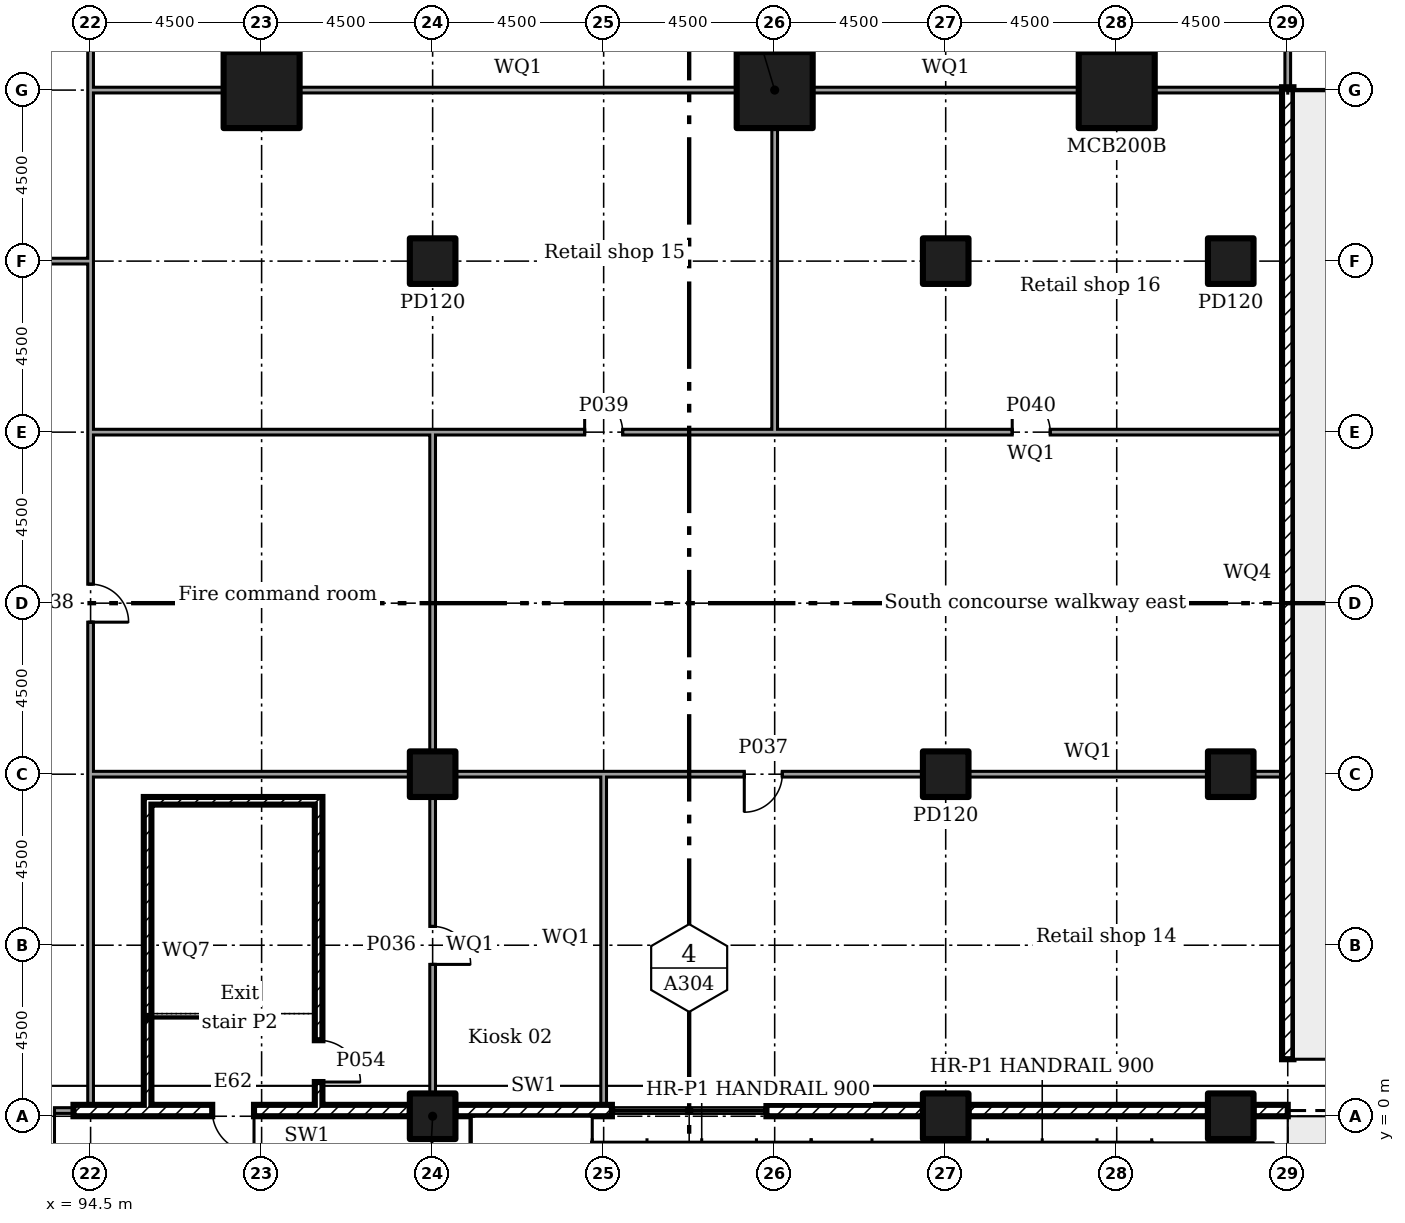
"""IFC4 building model, lengths in metres.
Left out: names, types, materials, properties, quantities, classifications, styles, units other than length and angle.
Written with IfcOpenShell. Run it as: python <this file> out.ifc"""

import sys

from ifc_helpers import new_model, si_unit, direction, frame, frame_2d, origin, origin_2d, place, context, subcontext, project, spatial, rectangle, extrude, element, fill, save


model = new_model("IFC4")
c1 = context("Model", 3, precision=1e-05, world=origin(), true_north=direction((0.0, 1.0)))
c2 = subcontext(c1, "Body", "Model", "MODEL_VIEW")
j1 = project(units=[si_unit("LENGTHUNIT", "METRE"), si_unit("PLANEANGLEUNIT", "RADIAN")], contexts=[c1])
p1 = place(None, origin())
s1 = spatial("IfcSite", under=j1, at=p1, CompositionType="ELEMENT")
p2 = place(p1, origin())
s2 = spatial("IfcBuilding", under=s1, at=p2, CompositionType="ELEMENT")
p3 = place(p2, origin())
s3 = spatial("IfcBuildingStorey", under=s2, at=p3, CompositionType="ELEMENT", Elevation=0.0)
for number, where in (
    (1, (99.0, 27.0, 0.0)),
    (2, (112.5, 27.0, 0.0)),
    (3, (121.5, 27.0, 0.0)),
):
    element("IfcColumn", number, at=place(p3, frame(where)), inside=s3, PredefinedType="COLUMN", context=c2, shape_type="SweptSolid", body=[
        extrude(rectangle(XDim=2.0, YDim=2.0, at=origin_2d()), origin(), (0.0, 0.0, 1.0), 6.0),
    ])
for number, where in (
    (4, (103.5, 0.0, 0.0)),
    (5, (103.5, 9.0, 0.0)),
    (6, (103.5, 22.5, 0.0)),
    (7, (117.0, 0.0, 0.0)),
    (8, (117.0, 9.0, 0.0)),
    (9, (117.0, 22.5, 0.0)),
    (10, (124.5, 0.0, 0.0)),
    (11, (124.5, 9.0, 0.0)),
    (12, (124.5, 22.5, 0.0)),
):
    element("IfcColumn", number, at=place(p3, frame(where)), inside=s3, PredefinedType="COLUMN", context=c2, shape_type="SweptSolid", body=[
        extrude(rectangle(XDim=1.2, YDim=1.2, at=origin_2d()), origin(), (0.0, 0.0, 1.0), 6.0),
    ])
p4 = place(p3, frame((90.6, 0.15, 0.0)))
e13 = element("IfcWall", 13, at=p4, inside=s3, PredefinedType="SOLIDWALL", context=c2, shape_type="SweptSolid", body=[
    extrude(rectangle(XDim=3.45, YDim=0.15, at=frame_2d((1.725, 0.0))), origin(), (0.0, 0.0, 1.0), 5.55),
])
p5 = place(p4, frame((0.55, 0.0, 0.0)))
e14 = element("IfcOpeningElement", 14, at=p5, cuts=e13, PredefinedType="OPENING", context=c2, shape_type="SweptSolid", body=[
    extrude(rectangle(XDim=2.4, YDim=2.7, at=frame_2d((1.2, 1.35))), frame((0.0, 0.085, 0.0), z_axis=(0.0, -1.0, 0.0), x_axis=(1.0, 0.0, 0.0)), (0.0, 0.0, 1.0), 0.17),
])
p6 = place(p3, frame((94.05, 0.15, 0.0)))
e15 = element("IfcWall", 15, at=p6, inside=s3, PredefinedType="ELEMENTEDWALL", context=c2, shape_type="SweptSolid", body=[
    extrude(rectangle(XDim=3.15, YDim=0.3, at=frame_2d((1.575, 0.0))), origin(), (0.0, 0.0, 1.0), 5.55),
])
p7 = place(p3, frame((97.2, 0.15, 0.0)))
e16 = element("IfcWall", 16, at=p7, inside=s3, PredefinedType="ELEMENTEDWALL", context=c2, shape_type="SweptSolid", body=[
    extrude(rectangle(XDim=2.1, YDim=0.3, at=frame_2d((1.05, 0.0))), origin(), (0.0, 0.0, 1.0), 5.55),
])
p8 = place(p7, frame((0.5, 0.0, 0.0)))
e17 = element("IfcOpeningElement", 17, at=p8, cuts=e16, PredefinedType="OPENING", context=c2, shape_type="SweptSolid", body=[
    extrude(rectangle(XDim=1.1, YDim=2.4, at=frame_2d((0.55, 1.2))), frame((0.0, 0.16, 0.0), z_axis=(0.0, -1.0, 0.0), x_axis=(1.0, 0.0, 0.0)), (0.0, 0.0, 1.0), 0.32),
])
p9 = place(p3, frame((99.3, 0.15, 0.0)))
e18 = element("IfcWall", 18, at=p9, inside=s3, PredefinedType="ELEMENTEDWALL", context=c2, shape_type="SweptSolid", body=[
    extrude(rectangle(XDim=3.6, YDim=0.3, at=frame_2d((1.8, 0.0))), origin(), (0.0, 0.0, 1.0), 5.55),
])
for number, where in (
    (19, (104.1, 0.15, 0.0)),
    (20, (112.283, 0.15, 0.0)),
):
    element("IfcWall", number, at=place(p3, frame(where)), inside=s3, PredefinedType="ELEMENTEDWALL", context=c2, shape_type="SweptSolid", body=[
        extrude(rectangle(XDim=4.116, YDim=0.3, at=frame_2d((2.058, 0.0))), origin(), (0.0, 0.0, 1.0), 5.55),
    ])
p10 = place(p3, frame((117.6, 0.15, 0.0)))
e21 = element("IfcWall", 21, at=p10, inside=s3, PredefinedType="ELEMENTEDWALL", context=c2, shape_type="SweptSolid", body=[
    extrude(rectangle(XDim=6.3, YDim=0.3, at=frame_2d((3.15, 0.0))), origin(), (0.0, 0.0, 1.0), 5.55),
])
p11 = place(p3, frame((125.1, 0.15, 0.0)))
e22 = element("IfcWall", 22, at=p11, inside=s3, PredefinedType="ELEMENTEDWALL", context=c2, shape_type="SweptSolid", body=[
    extrude(rectangle(XDim=0.4, YDim=0.3, at=frame_2d((0.2, 0.0))), origin(), (0.0, 0.0, 1.0), 5.55),
])
p12 = place(p3, frame((125.5, 0.15, 0.0)))
e23 = element("IfcWall", 23, at=p12, inside=s3, PredefinedType="ELEMENTEDWALL", context=c2, shape_type="SweptSolid", body=[
    extrude(rectangle(XDim=10.0, YDim=0.3, at=frame_2d((5.0, 0.0))), origin(), (0.0, 0.0, 1.0), 4.05),
])
p13 = place(p12, frame((0.5, 0.0, 0.0)))
e24 = element("IfcOpeningElement", 24, at=p13, cuts=e23, PredefinedType="OPENING", context=c2, shape_type="SweptSolid", body=[
    extrude(rectangle(XDim=9.0, YDim=3.5, at=frame_2d((4.5, 1.75))), frame((0.0, 0.16, 0.0), z_axis=(0.0, -1.0, 0.0), x_axis=(1.0, 0.0, 0.0)), (0.0, 0.0, 1.0), 0.32),
])
p14 = place(p3, frame((90.595, 22.5, 0.0)))
e25 = element("IfcWall", 25, at=p14, inside=s3, PredefinedType="PARTITIONING", context=c2, shape_type="SweptSolid", body=[
    extrude(rectangle(XDim=3.98, YDim=0.15, at=frame_2d((1.99, 0.0))), origin(), (0.0, 0.0, 1.0), 5.55),
])
p15 = place(p3, frame((94.5, 0.3, 0.0), z_axis=(0.0, 0.0, 1.0), x_axis=(0.0, 1.0, 0.0)))
e26 = element("IfcWall", 26, at=p15, inside=s3, PredefinedType="PARTITIONING", context=c2, shape_type="SweptSolid", body=[
    extrude(rectangle(XDim=8.775, YDim=0.15, at=frame_2d((4.387, 0.0))), origin(), (0.0, 0.0, 1.0), 5.55),
])
p16 = place(p3, frame((94.5, 9.0, 0.0), z_axis=(0.0, 0.0, 1.0), x_axis=(0.0, 1.0, 0.0)))
e27 = element("IfcWall", 27, at=p16, inside=s3, PredefinedType="PARTITIONING", context=c2, shape_type="SweptSolid", body=[
    extrude(rectangle(XDim=9.075, YDim=0.15, at=frame_2d((4.538, 0.0))), origin(), (0.0, 0.0, 1.0), 5.55),
])
p17 = place(p16, frame((4.0, 0.0, 0.0)))
e28 = element("IfcOpeningElement", 28, at=p17, cuts=e27, PredefinedType="OPENING", context=c2, shape_type="SweptSolid", body=[
    extrude(rectangle(XDim=1.0, YDim=2.1, at=frame_2d((0.5, 1.05))), frame((0.0, 0.085, 0.0), z_axis=(0.0, -1.0, 0.0), x_axis=(1.0, 0.0, 0.0)), (0.0, 0.0, 1.0), 0.17),
])
p18 = place(p3, frame((94.5, 18.0, 0.0), z_axis=(0.0, 0.0, 1.0), x_axis=(0.0, 1.0, 0.0)))
e29 = element("IfcWall", 29, at=p18, inside=s3, PredefinedType="PARTITIONING", context=c2, shape_type="SweptSolid", body=[
    extrude(rectangle(XDim=4.425, YDim=0.15, at=frame_2d((2.212, 0.0))), origin(), (0.0, 0.0, 1.0), 5.55),
])
p19 = place(p3, frame((94.5, 26.925, 0.0), z_axis=(0.0, 0.0, 1.0), x_axis=(0.0, 1.0, 0.0)))
e30 = element("IfcWall", 30, at=p19, inside=s3, PredefinedType="PARTITIONING", context=c2, shape_type="SweptSolid", body=[
    extrude(rectangle(XDim=3.58, YDim=0.15, at=frame_2d((1.79, 0.0))), origin(), (0.0, 0.0, 1.0), 5.55),
])
p20 = place(p3, frame((94.5, 22.5, 0.0), z_axis=(0.0, 0.0, 1.0), x_axis=(0.0, 1.0, 0.0)))
e31 = element("IfcWall", 31, at=p20, inside=s3, PredefinedType="PARTITIONING", context=c2, shape_type="SweptSolid", body=[
    extrude(rectangle(XDim=4.5, YDim=0.15, at=frame_2d((2.25, 0.0))), origin(), (0.0, 0.0, 1.0), 5.55),
])
p21 = place(p3, frame((99.0, 27.995, 0.0), z_axis=(0.0, 0.0, 1.0), x_axis=(0.0, 1.0, 0.0)))
e32 = element("IfcWall", 32, at=p21, inside=s3, PredefinedType="PARTITIONING", context=c2, shape_type="SweptSolid", body=[
    extrude(rectangle(XDim=3.505, YDim=0.15, at=frame_2d((1.752, 0.0))), origin(), (0.0, 0.0, 1.0), 5.55),
])
p22 = place(p3, frame((94.575, 27.0, 0.0)))
e33 = element("IfcWall", 33, at=p22, inside=s3, PredefinedType="PARTITIONING", context=c2, shape_type="SweptSolid", body=[
    extrude(rectangle(XDim=3.43, YDim=0.15, at=frame_2d((1.715, 0.0))), origin(), (0.0, 0.0, 1.0), 5.55),
])
p23 = place(p3, frame((112.5, 27.995, 0.0), z_axis=(0.0, 0.0, 1.0), x_axis=(0.0, 1.0, 0.0)))
e34 = element("IfcWall", 34, at=p23, inside=s3, PredefinedType="PARTITIONING", context=c2, shape_type="SweptSolid", body=[
    extrude(rectangle(XDim=3.43, YDim=0.15, at=frame_2d((1.715, 0.0))), origin(), (0.0, 0.0, 1.0), 5.55),
])
p24 = place(p3, frame((99.995, 27.0, 0.0)))
e35 = element("IfcWall", 35, at=p24, inside=s3, PredefinedType="PARTITIONING", context=c2, shape_type="SweptSolid", body=[
    extrude(rectangle(XDim=11.51, YDim=0.15, at=frame_2d((5.755, 0.0))), origin(), (0.0, 0.0, 1.0), 5.55),
])
p25 = place(p3, frame((113.495, 27.0, 0.0)))
e36 = element("IfcWall", 36, at=p25, inside=s3, PredefinedType="PARTITIONING", context=c2, shape_type="SweptSolid", body=[
    extrude(rectangle(XDim=7.01, YDim=0.15, at=frame_2d((3.505, 0.0))), origin(), (0.0, 0.0, 1.0), 5.55),
])
p26 = place(p3, frame((122.495, 27.0, 0.0)))
e37 = element("IfcWall", 37, at=p26, inside=s3, PredefinedType="PARTITIONING", context=c2, shape_type="SweptSolid", body=[
    extrude(rectangle(XDim=3.355, YDim=0.15, at=frame_2d((1.677, 0.0))), origin(), (0.0, 0.0, 1.0), 5.55),
])
p27 = place(p3, frame((126.0, 27.0, 0.0), z_axis=(0.0, 0.0, 1.0), x_axis=(0.0, 1.0, 0.0)))
e38 = element("IfcWall", 38, at=p27, inside=s3, PredefinedType="PARTITIONING", context=c2, shape_type="SweptSolid", body=[
    extrude(rectangle(XDim=3.505, YDim=0.15, at=frame_2d((1.752, 0.0))), origin(), (0.0, 0.0, 1.0), 5.55),
])
p28 = place(p3, frame((103.5, 0.595, 0.0), z_axis=(0.0, 0.0, 1.0), x_axis=(0.0, 1.0, 0.0)))
e39 = element("IfcWall", 39, at=p28, inside=s3, PredefinedType="PARTITIONING", context=c2, shape_type="SweptSolid", body=[
    extrude(rectangle(XDim=7.81, YDim=0.15, at=frame_2d((3.905, 0.0))), origin(), (0.0, 0.0, 1.0), 5.55),
])
p29 = place(p28, frame((3.4, 0.0, 0.0)))
e40 = element("IfcOpeningElement", 40, at=p29, cuts=e39, PredefinedType="OPENING", context=c2, shape_type="SweptSolid", body=[
    extrude(rectangle(XDim=1.0, YDim=2.1, at=frame_2d((0.5, 1.05))), frame((0.0, 0.085, 0.0), z_axis=(0.0, -1.0, 0.0), x_axis=(1.0, 0.0, 0.0)), (0.0, 0.0, 1.0), 0.17),
])
p30 = place(p3, frame((94.575, 9.0, 0.0)))
e41 = element("IfcWall", 41, at=p30, inside=s3, PredefinedType="PARTITIONING", context=c2, shape_type="SweptSolid", body=[
    extrude(rectangle(XDim=8.33, YDim=0.15, at=frame_2d((4.165, 0.0))), origin(), (0.0, 0.0, 1.0), 5.55),
])
p31 = place(p3, frame((96.0, 0.3, 0.0), z_axis=(0.0, 0.0, 1.0), x_axis=(0.0, 1.0, 0.0)))
e42 = element("IfcWall", 42, at=p31, inside=s3, PredefinedType="SOLIDWALL", context=c2, shape_type="SweptSolid", body=[
    extrude(rectangle(XDim=8.1, YDim=0.2, at=frame_2d((4.05, 0.0))), origin(), (0.0, 0.0, 1.0), 5.55),
])
p32 = place(p3, frame((100.5, 0.3, 0.0), z_axis=(0.0, 0.0, 1.0), x_axis=(0.0, 1.0, 0.0)))
e43 = element("IfcWall", 43, at=p32, inside=s3, PredefinedType="SOLIDWALL", context=c2, shape_type="SweptSolid", body=[
    extrude(rectangle(XDim=8.1, YDim=0.2, at=frame_2d((4.05, 0.0))), origin(), (0.0, 0.0, 1.0), 5.55),
])
p33 = place(p32, frame((0.6, 0.0, 0.0)))
e44 = element("IfcOpeningElement", 44, at=p33, cuts=e43, PredefinedType="OPENING", context=c2, shape_type="SweptSolid", body=[
    extrude(rectangle(XDim=1.1, YDim=2.1, at=frame_2d((0.55, 1.05))), frame((0.0, 0.11, 0.0), z_axis=(0.0, -1.0, 0.0), x_axis=(1.0, 0.0, 0.0)), (0.0, 0.0, 1.0), 0.22),
])
p34 = place(p3, frame((96.1, 8.3, 0.0)))
e45 = element("IfcWall", 45, at=p34, inside=s3, PredefinedType="SOLIDWALL", context=c2, shape_type="SweptSolid", body=[
    extrude(rectangle(XDim=4.3, YDim=0.2, at=frame_2d((2.15, 0.0))), origin(), (0.0, 0.0, 1.0), 5.55),
])
p35 = place(p3, frame((108.0, 0.3, 0.0), z_axis=(0.0, 0.0, 1.0), x_axis=(0.0, 1.0, 0.0)))
e46 = element("IfcWall", 46, at=p35, inside=s3, PredefinedType="PARTITIONING", context=c2, shape_type="SweptSolid", body=[
    extrude(rectangle(XDim=8.775, YDim=0.15, at=frame_2d((4.387, 0.0))), origin(), (0.0, 0.0, 1.0), 5.55),
])
p36 = place(p3, frame((104.095, 9.0, 0.0)))
e47 = element("IfcWall", 47, at=p36, inside=s3, PredefinedType="PARTITIONING", context=c2, shape_type="SweptSolid", body=[
    extrude(rectangle(XDim=3.83, YDim=0.15, at=frame_2d((1.915, 0.0))), origin(), (0.0, 0.0, 1.0), 5.55),
])
p37 = place(p3, frame((108.0, 9.0, 0.0)))
e48 = element("IfcWall", 48, at=p37, inside=s3, PredefinedType="PARTITIONING", context=c2, shape_type="SweptSolid", body=[
    extrude(rectangle(XDim=8.405, YDim=0.15, at=frame_2d((4.203, 0.0))), origin(), (0.0, 0.0, 1.0), 5.55),
])
p38 = place(p37, frame((3.7, 0.0, 0.0)))
e49 = element("IfcOpeningElement", 49, at=p38, cuts=e48, PredefinedType="OPENING", context=c2, shape_type="SweptSolid", body=[
    extrude(rectangle(XDim=1.0, YDim=2.1, at=frame_2d((0.5, 1.05))), frame((0.0, 0.085, 0.0), z_axis=(0.0, -1.0, 0.0), x_axis=(1.0, 0.0, 0.0)), (0.0, 0.0, 1.0), 0.17),
])
p39 = place(p3, frame((117.595, 9.0, 0.0)))
e50 = element("IfcWall", 50, at=p39, inside=s3, PredefinedType="PARTITIONING", context=c2, shape_type="SweptSolid", body=[
    extrude(rectangle(XDim=6.31, YDim=0.15, at=frame_2d((3.155, 0.0))), origin(), (0.0, 0.0, 1.0), 5.55),
])
p40 = place(p3, frame((125.095, 9.0, 0.0)))
e51 = element("IfcWall", 51, at=p40, inside=s3, PredefinedType="PARTITIONING", context=c2, shape_type="SweptSolid", body=[
    extrude(rectangle(XDim=0.905, YDim=0.15, at=frame_2d((0.453, 0.0))), origin(), (0.0, 0.0, 1.0), 5.55),
])
p41 = place(p3, frame((103.5, 9.595, 0.0), z_axis=(0.0, 0.0, 1.0), x_axis=(0.0, 1.0, 0.0)))
e52 = element("IfcWall", 52, at=p41, inside=s3, PredefinedType="PARTITIONING", context=c2, shape_type="SweptSolid", body=[
    extrude(rectangle(XDim=8.48, YDim=0.15, at=frame_2d((4.24, 0.0))), origin(), (0.0, 0.0, 1.0), 5.55),
])
p42 = place(p3, frame((94.575, 18.0, 0.0)))
e53 = element("IfcWall", 53, at=p42, inside=s3, PredefinedType="PARTITIONING", context=c2, shape_type="SweptSolid", body=[
    extrude(rectangle(XDim=8.85, YDim=0.15, at=frame_2d((4.425, 0.0))), origin(), (0.0, 0.0, 1.0), 5.55),
])
p43 = place(p3, frame((103.5, 18.0, 0.0)))
e54 = element("IfcWall", 54, at=p43, inside=s3, PredefinedType="PARTITIONING", context=c2, shape_type="SweptSolid", body=[
    extrude(rectangle(XDim=9.075, YDim=0.15, at=frame_2d((4.538, 0.0))), origin(), (0.0, 0.0, 1.0), 5.55),
])
p44 = place(p43, frame((4.0, 0.0, 0.0)))
e55 = element("IfcOpeningElement", 55, at=p44, cuts=e54, PredefinedType="OPENING", context=c2, shape_type="SweptSolid", body=[
    extrude(rectangle(XDim=1.0, YDim=2.1, at=frame_2d((0.5, 1.05))), frame((0.0, 0.085, 0.0), z_axis=(0.0, -1.0, 0.0), x_axis=(1.0, 0.0, 0.0)), (0.0, 0.0, 1.0), 0.17),
])
p45 = place(p3, frame((112.5, 18.0, 0.0)))
e56 = element("IfcWall", 56, at=p45, inside=s3, PredefinedType="PARTITIONING", context=c2, shape_type="SweptSolid", body=[
    extrude(rectangle(XDim=13.5, YDim=0.15, at=frame_2d((6.75, 0.0))), origin(), (0.0, 0.0, 1.0), 5.55),
])
p46 = place(p45, frame((6.25, 0.0, 0.0)))
e57 = element("IfcOpeningElement", 57, at=p46, cuts=e56, PredefinedType="OPENING", context=c2, shape_type="SweptSolid", body=[
    extrude(rectangle(XDim=1.0, YDim=2.1, at=frame_2d((0.5, 1.05))), frame((0.0, 0.085, 0.0), z_axis=(0.0, -1.0, 0.0), x_axis=(1.0, 0.0, 0.0)), (0.0, 0.0, 1.0), 0.17),
])
p47 = place(p3, frame((112.5, 18.075, 0.0), z_axis=(0.0, 0.0, 1.0), x_axis=(0.0, 1.0, 0.0)))
e58 = element("IfcWall", 58, at=p47, inside=s3, PredefinedType="PARTITIONING", context=c2, shape_type="SweptSolid", body=[
    extrude(rectangle(XDim=7.93, YDim=0.15, at=frame_2d((3.965, 0.0))), origin(), (0.0, 0.0, 1.0), 5.55),
])
p48 = place(p3, frame((126.0, 1.5, 0.0), z_axis=(0.0, 0.0, 1.0), x_axis=(0.0, 1.0, 0.0)))
e59 = element("IfcWall", 59, at=p48, inside=s3, PredefinedType="SOLIDWALL", context=c2, shape_type="SweptSolid", body=[
    extrude(rectangle(XDim=25.575, YDim=0.3, at=frame_2d((12.788, 0.0))), origin(), (0.0, 0.0, 1.0), 1.1),
])
p49 = place(p5, frame((2.4, 0.0, 0.0), x_axis=(-1.0, 0.0, 0.0)))
e60 = element("IfcDoor", 60, at=p49, inside=s3, OperationType="DOUBLE_DOOR_DOUBLE_SWING", PredefinedType="NOTDEFINED", context=c2, shape_type="SweptSolid", body=[
    extrude(rectangle(XDim=2.4, YDim=2.7, at=frame_2d((1.2, 1.35))), frame((0.0, 0.025, 0.0), z_axis=(0.0, -1.0, 0.0), x_axis=(1.0, 0.0, 0.0)), (0.0, 0.0, 1.0), 0.05),
])
fill(e14, e60)
p50 = place(p8, frame((1.1, 0.0, 0.0), x_axis=(-1.0, 0.0, 0.0)))
e61 = element("IfcDoor", 61, at=p50, inside=s3, OperationType="SINGLE_SWING_RIGHT", PredefinedType="NOTDEFINED", context=c2, shape_type="SweptSolid", body=[
    extrude(rectangle(XDim=1.1, YDim=2.4, at=frame_2d((0.55, 1.2))), frame((0.0, 0.025, 0.0), z_axis=(0.0, -1.0, 0.0), x_axis=(1.0, 0.0, 0.0)), (0.0, 0.0, 1.0), 0.05),
])
fill(e17, e61)
p51 = place(p13, origin())
e62 = element("IfcDoor", 62, at=p51, inside=s3, OperationType="ROLLINGUP", PredefinedType="NOTDEFINED", context=c2, shape_type="SweptSolid", body=[
    extrude(rectangle(XDim=9.0, YDim=3.5, at=frame_2d((4.5, 1.75))), frame((0.0, 0.025, 0.0), z_axis=(0.0, -1.0, 0.0), x_axis=(1.0, 0.0, 0.0)), (0.0, 0.0, 1.0), 0.05),
])
fill(e24, e62)
p52 = place(p29, frame((1.0, 0.0, 0.0), x_axis=(-1.0, 0.0, 0.0)))
e63 = element("IfcDoor", 63, at=p52, inside=s3, OperationType="SINGLE_SWING_LEFT", PredefinedType="DOOR", context=c2, shape_type="SweptSolid", body=[
    extrude(rectangle(XDim=1.0, YDim=2.1, at=frame_2d((0.5, 1.05))), frame((0.0, 0.025, 0.0), z_axis=(0.0, -1.0, 0.0), x_axis=(1.0, 0.0, 0.0)), (0.0, 0.0, 1.0), 0.05),
])
fill(e40, e63)
p53 = place(p38, frame((1.0, 0.0, 0.0), x_axis=(-1.0, 0.0, 0.0)))
e64 = element("IfcDoor", 64, at=p53, inside=s3, OperationType="SINGLE_SWING_LEFT", PredefinedType="DOOR", context=c2, shape_type="SweptSolid", body=[
    extrude(rectangle(XDim=1.0, YDim=2.1, at=frame_2d((0.5, 1.05))), frame((0.0, 0.025, 0.0), z_axis=(0.0, -1.0, 0.0), x_axis=(1.0, 0.0, 0.0)), (0.0, 0.0, 1.0), 0.05),
])
fill(e49, e64)
p54 = place(p17, frame((1.0, 0.0, 0.0), x_axis=(-1.0, 0.0, 0.0)))
e65 = element("IfcDoor", 65, at=p54, inside=s3, OperationType="SINGLE_SWING_LEFT", PredefinedType="DOOR", context=c2, shape_type="SweptSolid", body=[
    extrude(rectangle(XDim=1.0, YDim=2.1, at=frame_2d((0.5, 1.05))), frame((0.0, 0.025, 0.0), z_axis=(0.0, -1.0, 0.0), x_axis=(1.0, 0.0, 0.0)), (0.0, 0.0, 1.0), 0.05),
])
fill(e28, e65)
p55 = place(p44, origin())
e66 = element("IfcDoor", 66, at=p55, inside=s3, OperationType="SINGLE_SWING_RIGHT", PredefinedType="DOOR", context=c2, shape_type="SweptSolid", body=[
    extrude(rectangle(XDim=1.0, YDim=2.1, at=frame_2d((0.5, 1.05))), frame((0.0, 0.025, 0.0), z_axis=(0.0, -1.0, 0.0), x_axis=(1.0, 0.0, 0.0)), (0.0, 0.0, 1.0), 0.05),
])
fill(e55, e66)
p56 = place(p46, origin())
e67 = element("IfcDoor", 67, at=p56, inside=s3, OperationType="SINGLE_SWING_RIGHT", PredefinedType="DOOR", context=c2, shape_type="SweptSolid", body=[
    extrude(rectangle(XDim=1.0, YDim=2.1, at=frame_2d((0.5, 1.05))), frame((0.0, 0.025, 0.0), z_axis=(0.0, -1.0, 0.0), x_axis=(1.0, 0.0, 0.0)), (0.0, 0.0, 1.0), 0.05),
])
fill(e57, e67)
p57 = place(p33, frame((1.1, 0.0, 0.0), x_axis=(-1.0, 0.0, 0.0)))
e68 = element("IfcDoor", 68, at=p57, inside=s3, OperationType="SINGLE_SWING_LEFT", PredefinedType="DOOR", context=c2, shape_type="SweptSolid", body=[
    extrude(rectangle(XDim=1.1, YDim=2.1, at=frame_2d((0.55, 1.05))), frame((0.0, 0.025, 0.0), z_axis=(0.0, -1.0, 0.0), x_axis=(1.0, 0.0, 0.0)), (0.0, 0.0, 1.0), 0.05),
])
fill(e44, e68)
save(model, sys.argv[1])
